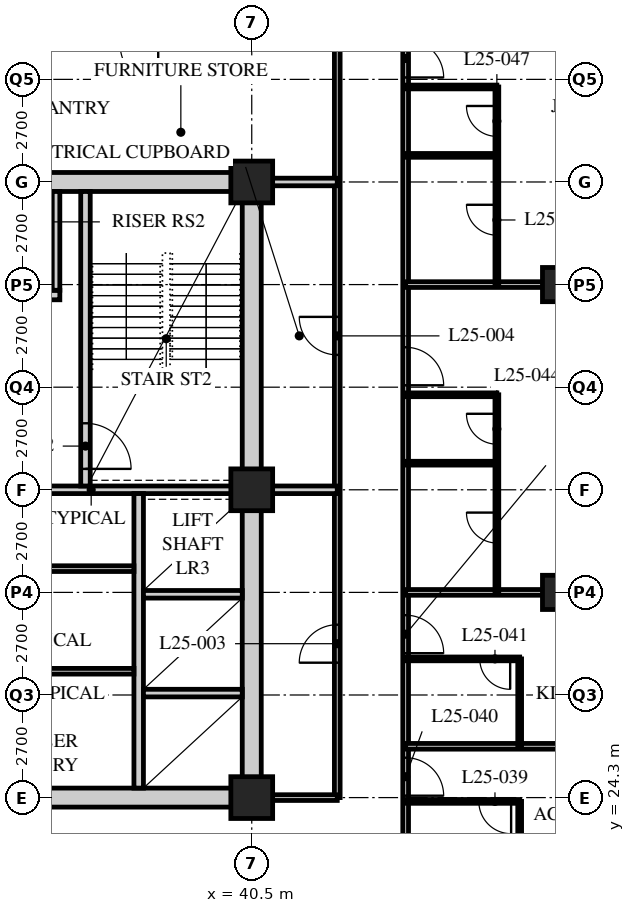
"""IFC4 building model, lengths in metres.
Left out: names, types, materials, properties, quantities, classifications, styles, units other than length and angle.
Written with IfcOpenShell. Run it as: python <this file> out.ifc"""

import sys

from ifc_helpers import new_model, si_unit, direction, frame, frame_2d, origin, origin_2d, place, context, subcontext, project, spatial, rectangle, hollow_rectangle, extrude, element, fill, save


model = new_model("IFC4")
c1 = context("Model", 3, precision=1e-05, world=origin(), true_north=direction((0.0, 1.0)))
c2 = subcontext(c1, "Body", "Model", "MODEL_VIEW")
j1 = project(units=[si_unit("LENGTHUNIT", "METRE"), si_unit("PLANEANGLEUNIT", "RADIAN")], contexts=[c1])
p1 = place(None, origin())
s1 = spatial("IfcSite", under=j1, at=p1, CompositionType="ELEMENT")
p2 = place(p1, origin())
s2 = spatial("IfcBuilding", under=s1, at=p2, CompositionType="ELEMENT")
p3 = place(p2, frame((0.0, 0.0, 103.4)))
s3 = spatial("IfcBuildingStorey", under=s2, at=p3, CompositionType="ELEMENT", Elevation=103.4)
for number, where, z_axis, x_axis in (
    (1, (40.5, 24.3, 0.0), (0.0, 0.0, 1.0), (1.0, 0.0, 0.0)),
    (2, (40.5, 32.4, 0.0), (0.0, 0.0, 1.0), (1.0, 0.0, 0.0)),
    (3, (40.5, 40.5, 0.0), (0.0, 0.0, 1.0), (1.0, 0.0, 0.0)),
):
    element("IfcColumn", number, at=place(p3, frame(where, z_axis=z_axis, x_axis=x_axis)), inside=s3, PredefinedType="COLUMN", context=c2, shape_type="SweptSolid", body=[
        extrude(hollow_rectangle(XDim=1.1, YDim=1.1, WallThickness=0.1, at=origin_2d()), origin(), (0.0, 0.0, 1.0), 3.4),
    ])
for number, where, z_axis, x_axis in (
    (4, (48.6, 29.7, 0.0), (0.0, 0.0, 1.0), (1.0, 0.0, 0.0)),
    (5, (48.6, 37.8, 0.0), (0.0, 0.0, 1.0), (1.0, 0.0, 0.0)),
):
    element("IfcColumn", number, at=place(p3, frame(where, z_axis=z_axis, x_axis=x_axis)), inside=s3, PredefinedType="COLUMN", context=c2, shape_type="SweptSolid", body=[
        extrude(hollow_rectangle(XDim=0.9, YDim=0.9, WallThickness=0.1, at=origin_2d()), origin(), (0.0, 0.0, 1.0), 3.4),
    ])
p4 = place(p3, frame((44.55, 21.6, 0.0), z_axis=(0.0, 0.0, 1.0), x_axis=(0.0, 1.0, 0.0)))
e6 = element("IfcWall", 6, at=p4, inside=s3, PredefinedType="PARTITIONING", context=c2, shape_type="SweptSolid", body=[
    extrude(rectangle(XDim=24.3, YDim=0.15, at=frame_2d((12.15, 0.0))), origin(), (0.0, 0.0, 1.0), 3.19),
])
p5 = place(p4, frame((2.75, 0.0, 0.0)))
e7 = element("IfcOpeningElement", 7, at=p5, cuts=e6, PredefinedType="OPENING", context=c2, shape_type="SweptSolid", body=[
    extrude(rectangle(XDim=1.0, YDim=2.1, at=frame_2d((0.5, 1.05))), frame((0.0, 0.085, 0.0), z_axis=(0.0, -1.0, 0.0), x_axis=(1.0, 0.0, 0.0)), (0.0, 0.0, 1.0), 0.17),
])
p6 = place(p4, frame((6.5, 0.0, 0.0)))
e8 = element("IfcOpeningElement", 8, at=p6, cuts=e6, PredefinedType="OPENING", context=c2, shape_type="SweptSolid", body=[
    extrude(rectangle(XDim=1.0, YDim=2.1, at=frame_2d((0.5, 1.05))), frame((0.0, 0.085, 0.0), z_axis=(0.0, -1.0, 0.0), x_axis=(1.0, 0.0, 0.0)), (0.0, 0.0, 1.0), 0.17),
])
p7 = place(p4, frame((13.55, 0.0, 0.0)))
e9 = element("IfcOpeningElement", 9, at=p7, cuts=e6, PredefinedType="OPENING", context=c2, shape_type="SweptSolid", body=[
    extrude(rectangle(XDim=1.0, YDim=2.1, at=frame_2d((0.5, 1.05))), frame((0.0, 0.085, 0.0), z_axis=(0.0, -1.0, 0.0), x_axis=(1.0, 0.0, 0.0)), (0.0, 0.0, 1.0), 0.17),
])
p8 = place(p4, frame((21.65, 0.0, 0.0)))
e10 = element("IfcOpeningElement", 10, at=p8, cuts=e6, PredefinedType="OPENING", context=c2, shape_type="SweptSolid", body=[
    extrude(rectangle(XDim=1.0, YDim=2.1, at=frame_2d((0.5, 1.05))), frame((0.0, 0.085, 0.0), z_axis=(0.0, -1.0, 0.0), x_axis=(1.0, 0.0, 0.0)), (0.0, 0.0, 1.0), 0.17),
])
p9 = place(p3, frame((42.75, 24.3, 0.0), z_axis=(0.0, 0.0, 1.0), x_axis=(0.0, 1.0, 0.0)))
e11 = element("IfcWall", 11, at=p9, inside=s3, PredefinedType="PARTITIONING", context=c2, shape_type="SweptSolid", body=[
    extrude(rectangle(XDim=19.8, YDim=0.15, at=frame_2d((9.9, 0.0))), origin(), (0.0, 0.0, 1.0), 3.19),
])
p10 = place(p9, frame((3.55, 0.0, 0.0)))
e12 = element("IfcOpeningElement", 12, at=p10, cuts=e11, PredefinedType="OPENING", context=c2, shape_type="SweptSolid", body=[
    extrude(rectangle(XDim=1.0, YDim=2.1, at=frame_2d((0.5, 1.05))), frame((0.0, 0.085, 0.0), z_axis=(0.0, -1.0, 0.0), x_axis=(1.0, 0.0, 0.0)), (0.0, 0.0, 1.0), 0.17),
])
p11 = place(p9, frame((11.65, 0.0, 0.0)))
e13 = element("IfcOpeningElement", 13, at=p11, cuts=e11, PredefinedType="OPENING", context=c2, shape_type="SweptSolid", body=[
    extrude(rectangle(XDim=1.0, YDim=2.1, at=frame_2d((0.5, 1.05))), frame((0.0, 0.085, 0.0), z_axis=(0.0, -1.0, 0.0), x_axis=(1.0, 0.0, 0.0)), (0.0, 0.0, 1.0), 0.17),
])
p12 = place(p3, frame((40.7, 24.3, 0.0), z_axis=(0.0, 0.0, 1.0), x_axis=(1.0, 0.0, 0.0)))
e14 = element("IfcWall", 14, at=p12, inside=s3, PredefinedType="PARTITIONING", context=c2, shape_type="SweptSolid", body=[
    extrude(rectangle(XDim=2.05, YDim=0.15, at=frame_2d((1.025, 0.0))), origin(), (0.0, 0.0, 1.0), 3.19),
])
for number, where, z_axis, x_axis in (
    (15, (40.5, 32.4, 0.0), (0.0, 0.0, 1.0), (1.0, 0.0, 0.0)),
    (16, (40.5, 40.5, 0.0), (0.0, 0.0, 1.0), (1.0, 0.0, 0.0)),
):
    element("IfcWall", number, at=place(p3, frame(where, z_axis=z_axis, x_axis=x_axis)), inside=s3, PredefinedType="SOLIDWALL", context=c2, shape_type="SweptSolid", body=[
        extrude(rectangle(XDim=2.25, YDim=0.2, at=frame_2d((1.125, 0.0))), origin(), (0.0, 0.0, 1.0), 3.19),
    ])
p13 = place(p3, frame((47.55, 21.6, 0.0), z_axis=(0.0, 0.0, 1.0), x_axis=(0.0, 1.0, 0.0)))
e17 = element("IfcWall", 17, at=p13, inside=s3, PredefinedType="PARTITIONING", context=c2, shape_type="SweptSolid", body=[
    extrude(rectangle(XDim=2.6, YDim=0.1, at=frame_2d((1.3, 0.0))), origin(), (0.0, 0.0, 1.0), 3.19),
])
p14 = place(p3, frame((44.55, 24.2, 0.0), z_axis=(0.0, 0.0, 1.0), x_axis=(1.0, 0.0, 0.0)))
e18 = element("IfcWall", 18, at=p14, inside=s3, PredefinedType="PARTITIONING", context=c2, shape_type="SweptSolid", body=[
    extrude(rectangle(XDim=3.0, YDim=0.1, at=frame_2d((1.5, 0.0))), origin(), (0.0, 0.0, 1.0), 3.19),
])
p15 = place(p14, frame((1.925, 0.0, 0.0)))
e19 = element("IfcOpeningElement", 19, at=p15, cuts=e18, PredefinedType="OPENING", context=c2, shape_type="SweptSolid", body=[
    extrude(rectangle(XDim=0.85, YDim=2.1, at=frame_2d((0.425, 1.05))), frame((0.0, 0.06, 0.0), z_axis=(0.0, -1.0, 0.0), x_axis=(1.0, 0.0, 0.0)), (0.0, 0.0, 1.0), 0.12),
])
p16 = place(p3, frame((44.55, 25.65, 0.0), z_axis=(0.0, 0.0, 1.0), x_axis=(1.0, 0.0, 0.0)))
e20 = element("IfcWall", 20, at=p16, inside=s3, PredefinedType="PARTITIONING", context=c2, shape_type="SweptSolid", body=[
    extrude(rectangle(XDim=11.85, YDim=0.15, at=frame_2d((5.925, 0.0))), origin(), (0.0, 0.0, 1.0), 3.19),
])
p17 = place(p3, frame((47.55, 25.65, 0.0), z_axis=(0.0, 0.0, 1.0), x_axis=(0.0, 1.0, 0.0)))
e21 = element("IfcWall", 21, at=p17, inside=s3, PredefinedType="PARTITIONING", context=c2, shape_type="SweptSolid", body=[
    extrude(rectangle(XDim=2.3, YDim=0.1, at=frame_2d((1.15, 0.0))), origin(), (0.0, 0.0, 1.0), 3.19),
])
p18 = place(p3, frame((44.55, 27.95, 0.0), z_axis=(0.0, 0.0, 1.0), x_axis=(1.0, 0.0, 0.0)))
e22 = element("IfcWall", 22, at=p18, inside=s3, PredefinedType="PARTITIONING", context=c2, shape_type="SweptSolid", body=[
    extrude(rectangle(XDim=3.0, YDim=0.1, at=frame_2d((1.5, 0.0))), origin(), (0.0, 0.0, 1.0), 3.19),
])
p19 = place(p18, frame((1.95, 0.0, 0.0)))
e23 = element("IfcOpeningElement", 23, at=p19, cuts=e22, PredefinedType="OPENING", context=c2, shape_type="SweptSolid", body=[
    extrude(rectangle(XDim=0.8, YDim=2.1, at=frame_2d((0.4, 1.05))), frame((0.0, 0.06, 0.0), z_axis=(0.0, -1.0, 0.0), x_axis=(1.0, 0.0, 0.0)), (0.0, 0.0, 1.0), 0.12),
])
p20 = place(p3, frame((44.55, 29.7, 0.0), z_axis=(0.0, 0.0, 1.0), x_axis=(1.0, 0.0, 0.0)))
e24 = element("IfcWall", 24, at=p20, inside=s3, PredefinedType="PARTITIONING", context=c2, shape_type="SweptSolid", body=[
    extrude(rectangle(XDim=11.85, YDim=0.15, at=frame_2d((5.925, 0.0))), origin(), (0.0, 0.0, 1.0), 2.578),
])
p21 = place(p3, frame((46.95, 29.7, 0.0), z_axis=(0.0, 0.0, 1.0), x_axis=(0.0, 1.0, 0.0)))
e25 = element("IfcWall", 25, at=p21, inside=s3, PredefinedType="PARTITIONING", context=c2, shape_type="SweptSolid", body=[
    extrude(rectangle(XDim=5.2, YDim=0.1, at=frame_2d((2.6, 0.0))), origin(), (0.0, 0.0, 1.0), 3.19),
])
p22 = place(p21, frame((1.3, 0.0, 0.0)))
e26 = element("IfcOpeningElement", 26, at=p22, cuts=e25, PredefinedType="OPENING", context=c2, shape_type="SweptSolid", body=[
    extrude(rectangle(XDim=0.8, YDim=2.1, at=frame_2d((0.4, 1.05))), frame((0.0, 0.06, 0.0), z_axis=(0.0, -1.0, 0.0), x_axis=(1.0, 0.0, 0.0)), (0.0, 0.0, 1.0), 0.12),
])
p23 = place(p21, frame((3.9, 0.0, 0.0)))
e27 = element("IfcOpeningElement", 27, at=p23, cuts=e25, PredefinedType="OPENING", context=c2, shape_type="SweptSolid", body=[
    extrude(rectangle(XDim=0.8, YDim=2.1, at=frame_2d((0.4, 1.05))), frame((0.0, 0.06, 0.0), z_axis=(0.0, -1.0, 0.0), x_axis=(1.0, 0.0, 0.0)), (0.0, 0.0, 1.0), 0.12),
])
for number, where, z_axis, x_axis in (
    (28, (44.55, 33.1, 0.0), (0.0, 0.0, 1.0), (1.0, 0.0, 0.0)),
    (29, (44.55, 34.9, 0.0), (0.0, 0.0, 1.0), (1.0, 0.0, 0.0)),
):
    element("IfcWall", number, at=place(p3, frame(where, z_axis=z_axis, x_axis=x_axis)), inside=s3, PredefinedType="PARTITIONING", context=c2, shape_type="SweptSolid", body=[
        extrude(rectangle(XDim=2.4, YDim=0.1, at=frame_2d((1.2, 0.0))), origin(), (0.0, 0.0, 1.0), 3.19),
    ])
p24 = place(p3, frame((44.55, 37.8, 0.0), z_axis=(0.0, 0.0, 1.0), x_axis=(1.0, 0.0, 0.0)))
e30 = element("IfcWall", 30, at=p24, inside=s3, PredefinedType="PARTITIONING", context=c2, shape_type="SweptSolid", body=[
    extrude(rectangle(XDim=11.85, YDim=0.15, at=frame_2d((5.925, 0.0))), origin(), (0.0, 0.0, 1.0), 2.578),
])
p25 = place(p3, frame((46.95, 37.8, 0.0), z_axis=(0.0, 0.0, 1.0), x_axis=(0.0, 1.0, 0.0)))
e31 = element("IfcWall", 31, at=p25, inside=s3, PredefinedType="PARTITIONING", context=c2, shape_type="SweptSolid", body=[
    extrude(rectangle(XDim=5.2, YDim=0.1, at=frame_2d((2.6, 0.0))), origin(), (0.0, 0.0, 1.0), 3.19),
])
p26 = place(p25, frame((1.3, 0.0, 0.0)))
e32 = element("IfcOpeningElement", 32, at=p26, cuts=e31, PredefinedType="OPENING", context=c2, shape_type="SweptSolid", body=[
    extrude(rectangle(XDim=0.8, YDim=2.1, at=frame_2d((0.4, 1.05))), frame((0.0, 0.06, 0.0), z_axis=(0.0, -1.0, 0.0), x_axis=(1.0, 0.0, 0.0)), (0.0, 0.0, 1.0), 0.12),
])
p27 = place(p25, frame((3.9, 0.0, 0.0)))
e33 = element("IfcOpeningElement", 33, at=p27, cuts=e31, PredefinedType="OPENING", context=c2, shape_type="SweptSolid", body=[
    extrude(rectangle(XDim=0.8, YDim=2.1, at=frame_2d((0.4, 1.05))), frame((0.0, 0.06, 0.0), z_axis=(0.0, -1.0, 0.0), x_axis=(1.0, 0.0, 0.0)), (0.0, 0.0, 1.0), 0.12),
])
for number, where, z_axis, x_axis in (
    (34, (44.55, 41.2, 0.0), (0.0, 0.0, 1.0), (1.0, 0.0, 0.0)),
    (35, (44.55, 43.0, 0.0), (0.0, 0.0, 1.0), (1.0, 0.0, 0.0)),
):
    element("IfcWall", number, at=place(p3, frame(where, z_axis=z_axis, x_axis=x_axis)), inside=s3, PredefinedType="PARTITIONING", context=c2, shape_type="SweptSolid", body=[
        extrude(rectangle(XDim=2.4, YDim=0.1, at=frame_2d((1.2, 0.0))), origin(), (0.0, 0.0, 1.0), 3.19),
    ])
p28 = place(p3, frame((15.95, 24.3, 0.0), z_axis=(0.0, 0.0, 1.0), x_axis=(1.0, 0.0, 0.0)))
e36 = element("IfcWall", 36, at=p28, inside=s3, PredefinedType="SOLIDWALL", context=c2, shape_type="SweptSolid", body=[
    extrude(rectangle(XDim=24.8, YDim=0.5, at=frame_2d((12.4, 0.0))), origin(), (0.0, 0.0, 1.0), 2.54),
])
p29 = place(p28, frame((11.5, 0.0, 0.0)))
e37 = element("IfcOpeningElement", 37, at=p29, cuts=e36, PredefinedType="OPENING", context=c2, shape_type="SweptSolid", body=[
    extrude(rectangle(XDim=1.8, YDim=2.4, at=frame_2d((0.9, 1.2))), frame((0.0, 0.26, 0.0), z_axis=(0.0, -1.0, 0.0), x_axis=(1.0, 0.0, 0.0)), (0.0, 0.0, 1.0), 0.52),
])
p30 = place(p3, frame((15.95, 40.5, 0.0), z_axis=(0.0, 0.0, 1.0), x_axis=(1.0, 0.0, 0.0)))
e38 = element("IfcWall", 38, at=p30, inside=s3, PredefinedType="SOLIDWALL", context=c2, shape_type="SweptSolid", body=[
    extrude(rectangle(XDim=24.8, YDim=0.5, at=frame_2d((12.4, 0.0))), origin(), (0.0, 0.0, 1.0), 2.54),
])
p31 = place(p30, frame((11.5, 0.0, 0.0)))
e39 = element("IfcOpeningElement", 39, at=p31, cuts=e38, PredefinedType="OPENING", context=c2, shape_type="SweptSolid", body=[
    extrude(rectangle(XDim=1.8, YDim=2.4, at=frame_2d((0.9, 1.2))), frame((0.0, 0.26, 0.0), z_axis=(0.0, -1.0, 0.0), x_axis=(1.0, 0.0, 0.0)), (0.0, 0.0, 1.0), 0.52),
])
p32 = place(p3, frame((40.5, 24.55, 0.0), z_axis=(0.0, 0.0, 1.0), x_axis=(0.0, 1.0, 0.0)))
e40 = element("IfcWall", 40, at=p32, inside=s3, PredefinedType="SOLIDWALL", context=c2, shape_type="SweptSolid", body=[
    extrude(rectangle(XDim=15.7, YDim=0.5, at=frame_2d((7.85, 0.0))), origin(), (0.0, 0.0, 1.0), 2.578),
])
p33 = place(p3, frame((32.3, 32.4, 0.0), z_axis=(0.0, 0.0, 1.0), x_axis=(1.0, 0.0, 0.0)))
e41 = element("IfcWall", 41, at=p33, inside=s3, PredefinedType="SOLIDWALL", context=c2, shape_type="SweptSolid", body=[
    extrude(rectangle(XDim=7.95, YDim=0.2, at=frame_2d((3.975, 0.0))), origin(), (0.0, 0.0, 1.0), 2.578),
])
p34 = place(p3, frame((37.525, 24.55, 0.0), z_axis=(0.0, 0.0, 1.0), x_axis=(0.0, 1.0, 0.0)))
e42 = element("IfcWall", 42, at=p34, inside=s3, PredefinedType="SOLIDWALL", context=c2, shape_type="SweptSolid", body=[
    extrude(rectangle(XDim=7.75, YDim=0.25, at=frame_2d((3.875, 0.0))), origin(), (0.0, 0.0, 1.0), 3.19),
])
for number, where, z_axis, x_axis in (
    (43, (37.65, 27.05, 0.0), (0.0, 0.0, 1.0), (1.0, 0.0, 0.0)),
    (44, (37.65, 29.65, 0.0), (0.0, 0.0, 1.0), (1.0, 0.0, 0.0)),
):
    element("IfcWall", number, at=place(p3, frame(where, z_axis=z_axis, x_axis=x_axis)), inside=s3, PredefinedType="SOLIDWALL", context=c2, shape_type="SweptSolid", body=[
        extrude(rectangle(XDim=2.6, YDim=0.2, at=frame_2d((1.3, 0.0))), origin(), (0.0, 0.0, 1.0), 3.19),
    ])
p35 = place(p3, frame((36.125, 32.5, 0.0), z_axis=(0.0, 0.0, 1.0), x_axis=(0.0, 1.0, 0.0)))
e45 = element("IfcWall", 45, at=p35, inside=s3, PredefinedType="SOLIDWALL", context=c2, shape_type="SweptSolid", body=[
    extrude(rectangle(XDim=7.75, YDim=0.25, at=frame_2d((3.875, 0.0))), origin(), (0.0, 0.0, 1.0), 3.19),
])
p36 = place(p35, frame((0.45, 0.0, 0.0)))
e46 = element("IfcOpeningElement", 46, at=p36, cuts=e45, PredefinedType="OPENING", context=c2, shape_type="SweptSolid", body=[
    extrude(rectangle(XDim=1.2, YDim=2.1, at=frame_2d((0.6, 1.05))), frame((0.0, 0.135, 0.0), z_axis=(0.0, -1.0, 0.0), x_axis=(1.0, 0.0, 0.0)), (0.0, 0.0, 1.0), 0.27),
])
p37 = place(p3, frame((32.5, 37.525, 0.0), z_axis=(0.0, 0.0, 1.0), x_axis=(1.0, 0.0, 0.0)))
e47 = element("IfcWall", 47, at=p37, inside=s3, PredefinedType="SOLIDWALL", context=c2, shape_type="SweptSolid", body=[
    extrude(rectangle(XDim=2.95, YDim=0.25, at=frame_2d((1.475, 0.0))), origin(), (0.0, 0.0, 1.0), 3.19),
])
p38 = place(p37, frame((0.9, 0.0, 0.0)))
e48 = element("IfcOpeningElement", 48, at=p38, cuts=e47, PredefinedType="OPENING", context=c2, shape_type="SweptSolid", body=[
    extrude(rectangle(XDim=1.1, YDim=2.4, at=frame_2d((0.55, 1.2))), frame((0.0, 0.135, 0.0), z_axis=(0.0, -1.0, 0.0), x_axis=(1.0, 0.0, 0.0)), (0.0, 0.0, 1.0), 0.27),
])
p39 = place(p3, frame((35.35, 37.65, 0.0), z_axis=(0.0, 0.0, 1.0), x_axis=(0.0, 1.0, 0.0)))
e49 = element("IfcWall", 49, at=p39, inside=s3, PredefinedType="SOLIDWALL", context=c2, shape_type="SweptSolid", body=[
    extrude(rectangle(XDim=2.6, YDim=0.2, at=frame_2d((1.3, 0.0))), origin(), (0.0, 0.0, 1.0), 3.19),
])
for number, where, z_axis, x_axis in (
    (50, (32.5, 27.625, 0.0), (0.0, 0.0, 1.0), (1.0, 0.0, 0.0)),
    (51, (32.5, 30.325, 0.0), (0.0, 0.0, 1.0), (1.0, 0.0, 0.0)),
):
    element("IfcWall", number, at=place(p3, frame(where, z_axis=z_axis, x_axis=x_axis)), inside=s3, PredefinedType="PARTITIONING", context=c2, shape_type="SweptSolid", body=[
        extrude(rectangle(XDim=4.9, YDim=0.15, at=frame_2d((2.45, 0.0))), origin(), (0.0, 0.0, 1.0), 3.19),
    ])
p40 = place(p10, origin())
e52 = element("IfcDoor", 52, at=p40, inside=s3, OperationType="SINGLE_SWING_LEFT", PredefinedType="DOOR", context=c2, shape_type="SweptSolid", body=[
    extrude(rectangle(XDim=1.0, YDim=2.1, at=frame_2d((0.5, 1.05))), frame((0.0, 0.025, 0.0), z_axis=(0.0, -1.0, 0.0), x_axis=(1.0, 0.0, 0.0)), (0.0, 0.0, 1.0), 0.05),
])
fill(e12, e52)
p41 = place(p11, origin())
e53 = element("IfcDoor", 53, at=p41, inside=s3, OperationType="SINGLE_SWING_RIGHT", PredefinedType="DOOR", context=c2, shape_type="SweptSolid", body=[
    extrude(rectangle(XDim=1.0, YDim=2.1, at=frame_2d((0.5, 1.05))), frame((0.0, 0.025, 0.0), z_axis=(0.0, -1.0, 0.0), x_axis=(1.0, 0.0, 0.0)), (0.0, 0.0, 1.0), 0.05),
])
fill(e13, e53)
p42 = place(p15, origin())
e54 = element("IfcDoor", 54, at=p42, inside=s3, OperationType="SINGLE_SWING_LEFT", PredefinedType="DOOR", context=c2, shape_type="SweptSolid", body=[
    extrude(rectangle(XDim=0.85, YDim=2.1, at=frame_2d((0.425, 1.05))), frame((0.0, 0.025, 0.0), z_axis=(0.0, -1.0, 0.0), x_axis=(1.0, 0.0, 0.0)), (0.0, 0.0, 1.0), 0.05),
])
fill(e19, e54)
p43 = place(p5, origin())
e55 = element("IfcDoor", 55, at=p43, inside=s3, OperationType="SINGLE_SWING_RIGHT", PredefinedType="DOOR", context=c2, shape_type="SweptSolid", body=[
    extrude(rectangle(XDim=1.0, YDim=2.1, at=frame_2d((0.5, 1.05))), frame((0.0, 0.025, 0.0), z_axis=(0.0, -1.0, 0.0), x_axis=(1.0, 0.0, 0.0)), (0.0, 0.0, 1.0), 0.05),
])
fill(e7, e55)
p44 = place(p19, origin())
e56 = element("IfcDoor", 56, at=p44, inside=s3, OperationType="SINGLE_SWING_LEFT", PredefinedType="DOOR", context=c2, shape_type="SweptSolid", body=[
    extrude(rectangle(XDim=0.8, YDim=2.1, at=frame_2d((0.4, 1.05))), frame((0.0, 0.025, 0.0), z_axis=(0.0, -1.0, 0.0), x_axis=(1.0, 0.0, 0.0)), (0.0, 0.0, 1.0), 0.05),
])
fill(e23, e56)
p45 = place(p6, origin())
e57 = element("IfcDoor", 57, at=p45, inside=s3, OperationType="SINGLE_SWING_RIGHT", PredefinedType="DOOR", context=c2, shape_type="SweptSolid", body=[
    extrude(rectangle(XDim=1.0, YDim=2.1, at=frame_2d((0.5, 1.05))), frame((0.0, 0.025, 0.0), z_axis=(0.0, -1.0, 0.0), x_axis=(1.0, 0.0, 0.0)), (0.0, 0.0, 1.0), 0.05),
])
fill(e8, e57)
p46 = place(p22, origin())
e58 = element("IfcDoor", 58, at=p46, inside=s3, OperationType="SINGLE_SWING_RIGHT", PredefinedType="DOOR", context=c2, shape_type="SweptSolid", body=[
    extrude(rectangle(XDim=0.8, YDim=2.1, at=frame_2d((0.4, 1.05))), frame((0.0, 0.025, 0.0), z_axis=(0.0, -1.0, 0.0), x_axis=(1.0, 0.0, 0.0)), (0.0, 0.0, 1.0), 0.05),
])
fill(e26, e58)
p47 = place(p23, origin())
e59 = element("IfcDoor", 59, at=p47, inside=s3, OperationType="SINGLE_SWING_RIGHT", PredefinedType="DOOR", context=c2, shape_type="SweptSolid", body=[
    extrude(rectangle(XDim=0.8, YDim=2.1, at=frame_2d((0.4, 1.05))), frame((0.0, 0.025, 0.0), z_axis=(0.0, -1.0, 0.0), x_axis=(1.0, 0.0, 0.0)), (0.0, 0.0, 1.0), 0.05),
])
fill(e27, e59)
p48 = place(p7, origin())
e60 = element("IfcDoor", 60, at=p48, inside=s3, OperationType="SINGLE_SWING_RIGHT", PredefinedType="DOOR", context=c2, shape_type="SweptSolid", body=[
    extrude(rectangle(XDim=1.0, YDim=2.1, at=frame_2d((0.5, 1.05))), frame((0.0, 0.025, 0.0), z_axis=(0.0, -1.0, 0.0), x_axis=(1.0, 0.0, 0.0)), (0.0, 0.0, 1.0), 0.05),
])
fill(e9, e60)
p49 = place(p26, origin())
e61 = element("IfcDoor", 61, at=p49, inside=s3, OperationType="SINGLE_SWING_RIGHT", PredefinedType="DOOR", context=c2, shape_type="SweptSolid", body=[
    extrude(rectangle(XDim=0.8, YDim=2.1, at=frame_2d((0.4, 1.05))), frame((0.0, 0.025, 0.0), z_axis=(0.0, -1.0, 0.0), x_axis=(1.0, 0.0, 0.0)), (0.0, 0.0, 1.0), 0.05),
])
fill(e32, e61)
p50 = place(p27, origin())
e62 = element("IfcDoor", 62, at=p50, inside=s3, OperationType="SINGLE_SWING_RIGHT", PredefinedType="DOOR", context=c2, shape_type="SweptSolid", body=[
    extrude(rectangle(XDim=0.8, YDim=2.1, at=frame_2d((0.4, 1.05))), frame((0.0, 0.025, 0.0), z_axis=(0.0, -1.0, 0.0), x_axis=(1.0, 0.0, 0.0)), (0.0, 0.0, 1.0), 0.05),
])
fill(e33, e62)
p51 = place(p8, origin())
e63 = element("IfcDoor", 63, at=p51, inside=s3, OperationType="SINGLE_SWING_RIGHT", PredefinedType="DOOR", context=c2, shape_type="SweptSolid", body=[
    extrude(rectangle(XDim=1.0, YDim=2.1, at=frame_2d((0.5, 1.05))), frame((0.0, 0.025, 0.0), z_axis=(0.0, -1.0, 0.0), x_axis=(1.0, 0.0, 0.0)), (0.0, 0.0, 1.0), 0.05),
])
fill(e10, e63)
p52 = place(p36, origin())
e64 = element("IfcDoor", 64, at=p52, inside=s3, OperationType="SINGLE_SWING_RIGHT", PredefinedType="DOOR", context=c2, shape_type="SweptSolid", body=[
    extrude(rectangle(XDim=1.2, YDim=2.1, at=frame_2d((0.6, 1.05))), frame((0.0, 0.025, 0.0), z_axis=(0.0, -1.0, 0.0), x_axis=(1.0, 0.0, 0.0)), (0.0, 0.0, 1.0), 0.05),
])
fill(e46, e64)
save(model, sys.argv[1])
